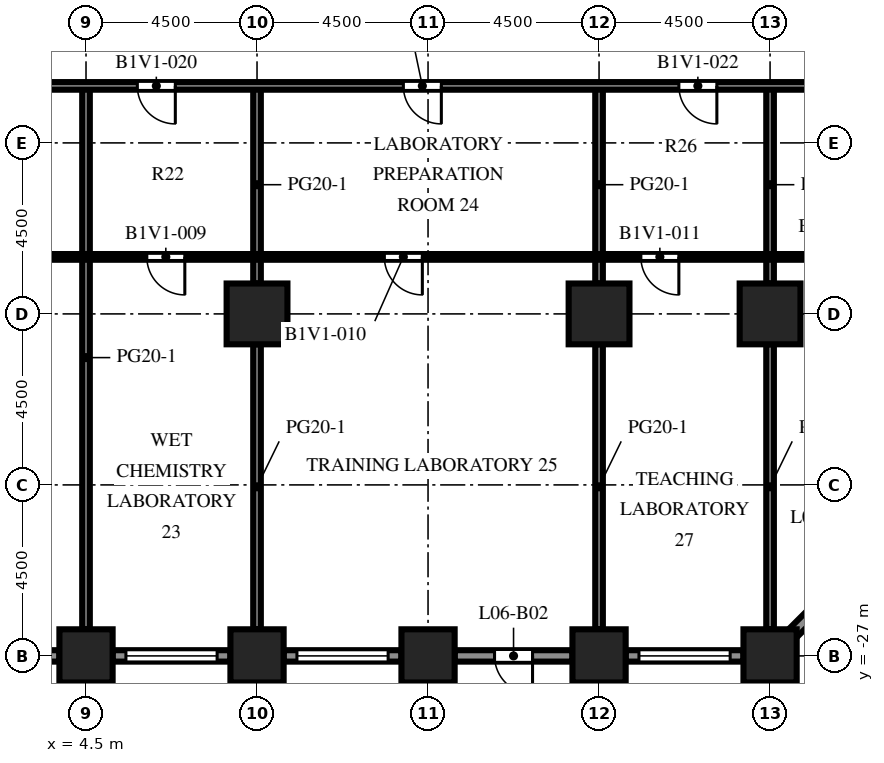
"""IFC4 building model, lengths in metres.
Left out: names, types, materials, properties, quantities, classifications, styles, units other than length and angle.
Written with IfcOpenShell. Run it as: python <this file> out.ifc"""

import sys

from ifc_helpers import new_model, si_unit, direction, frame, frame_2d, origin, origin_2d, place, context, subcontext, project, spatial, rectangle, extrude, element, fill, save


model = new_model("IFC4")
c1 = context("Model", 3, precision=1e-05, world=origin(), true_north=direction((0.0, 1.0)))
c2 = subcontext(c1, "Body", "Model", "MODEL_VIEW")
j1 = project(units=[si_unit("LENGTHUNIT", "METRE"), si_unit("PLANEANGLEUNIT", "RADIAN")], contexts=[c1])
p1 = place(None, origin())
s1 = spatial("IfcSite", under=j1, at=p1, CompositionType="ELEMENT")
p2 = place(p1, origin())
s2 = spatial("IfcBuilding", under=s1, at=p2, CompositionType="ELEMENT")
p3 = place(p2, frame((0.0, 0.0, 27.7)))
s3 = spatial("IfcBuildingStorey", under=s2, at=p3, CompositionType="ELEMENT", Elevation=27.7)
for number, where, z_axis, x_axis in (
    (1, (4.5, -27.0, 0.0), (0.0, 0.0, 1.0), (1.0, 0.0, 0.0)),
    (2, (9.0, -27.0, 0.0), (0.0, 0.0, 1.0), (1.0, 0.0, 0.0)),
    (3, (13.5, -27.0, 0.0), (0.0, 0.0, 1.0), (1.0, 0.0, 0.0)),
    (4, (18.0, -27.0, 0.0), (0.0, 0.0, 1.0), (1.0, 0.0, 0.0)),
    (5, (22.5, -27.0, 0.0), (0.0, 0.0, 1.0), (1.0, 0.0, 0.0)),
):
    element("IfcColumn", number, at=place(p3, frame(where, z_axis=z_axis, x_axis=x_axis)), inside=s3, PredefinedType="COLUMN", context=c2, shape_type="SweptSolid", body=[
        extrude(rectangle(XDim=1.4, YDim=1.4, at=origin_2d()), origin(), (0.0, 0.0, 1.0), 4.1),
    ])
for number, where, z_axis, x_axis in (
    (6, (9.0, -18.0, 0.0), (0.0, 0.0, 1.0), (1.0, 0.0, 0.0)),
    (7, (18.0, -18.0, 0.0), (0.0, 0.0, 1.0), (1.0, 0.0, 0.0)),
    (8, (22.5, -18.0, 0.0), (0.0, 0.0, 1.0), (1.0, 0.0, 0.0)),
):
    element("IfcColumn", number, at=place(p3, frame(where, z_axis=z_axis, x_axis=x_axis)), inside=s3, PredefinedType="COLUMN", context=c2, shape_type="SweptSolid", body=[
        extrude(rectangle(XDim=1.6, YDim=1.6, at=origin_2d()), origin(), (0.0, 0.0, 1.0), 4.1),
    ])
p4 = place(p3, frame((3.8, -27.0, 0.0), z_axis=(0.0, 0.0, 1.0), x_axis=(-1.0, 0.0, 0.0)))
e9 = element("IfcWall", 9, at=p4, inside=s3, PredefinedType="SOLIDWALL", context=c2, shape_type="SweptSolid", body=[
    extrude(rectangle(XDim=3.1, YDim=0.3, at=frame_2d((1.55, 0.0))), origin(), (0.0, 0.0, 1.0), 2.75),
])
p5 = place(p4, frame((0.35, 0.0, 0.8)))
e10 = element("IfcOpeningElement", 10, at=p5, cuts=e9, PredefinedType="OPENING", context=c2, shape_type="SweptSolid", body=[
    extrude(rectangle(XDim=2.4, YDim=1.7, at=frame_2d((1.2, 0.85))), frame((0.0, 0.16, 0.0), z_axis=(0.0, -1.0, 0.0), x_axis=(1.0, 0.0, 0.0)), (0.0, 0.0, 1.0), 0.32),
])
p6 = place(p3, frame((8.3, -27.0, 0.0), z_axis=(0.0, 0.0, 1.0), x_axis=(-1.0, 0.0, 0.0)))
e11 = element("IfcWall", 11, at=p6, inside=s3, PredefinedType="SOLIDWALL", context=c2, shape_type="SweptSolid", body=[
    extrude(rectangle(XDim=3.1, YDim=0.3, at=frame_2d((1.55, 0.0))), origin(), (0.0, 0.0, 1.0), 2.75),
])
p7 = place(p6, frame((0.35, 0.0, 0.8)))
e12 = element("IfcOpeningElement", 12, at=p7, cuts=e11, PredefinedType="OPENING", context=c2, shape_type="SweptSolid", body=[
    extrude(rectangle(XDim=2.4, YDim=1.7, at=frame_2d((1.2, 0.85))), frame((0.0, 0.16, 0.0), z_axis=(0.0, -1.0, 0.0), x_axis=(1.0, 0.0, 0.0)), (0.0, 0.0, 1.0), 0.32),
])
p8 = place(p3, frame((12.8, -27.0, 0.0), z_axis=(0.0, 0.0, 1.0), x_axis=(-1.0, 0.0, 0.0)))
e13 = element("IfcWall", 13, at=p8, inside=s3, PredefinedType="SOLIDWALL", context=c2, shape_type="SweptSolid", body=[
    extrude(rectangle(XDim=3.1, YDim=0.3, at=frame_2d((1.55, 0.0))), origin(), (0.0, 0.0, 1.0), 2.75),
])
p9 = place(p8, frame((0.35, 0.0, 0.8)))
e14 = element("IfcOpeningElement", 14, at=p9, cuts=e13, PredefinedType="OPENING", context=c2, shape_type="SweptSolid", body=[
    extrude(rectangle(XDim=2.4, YDim=1.7, at=frame_2d((1.2, 0.85))), frame((0.0, 0.16, 0.0), z_axis=(0.0, -1.0, 0.0), x_axis=(1.0, 0.0, 0.0)), (0.0, 0.0, 1.0), 0.32),
])
p10 = place(p3, frame((17.3, -27.0, 0.0), z_axis=(0.0, 0.0, 1.0), x_axis=(-1.0, 0.0, 0.0)))
e15 = element("IfcWall", 15, at=p10, inside=s3, PredefinedType="SOLIDWALL", context=c2, shape_type="SweptSolid", body=[
    extrude(rectangle(XDim=3.1, YDim=0.3, at=frame_2d((1.55, 0.0))), origin(), (0.0, 0.0, 1.0), 2.75),
])
p11 = place(p10, frame((1.05, 0.0, 0.0)))
e16 = element("IfcOpeningElement", 16, at=p11, cuts=e15, PredefinedType="OPENING", context=c2, shape_type="SweptSolid", body=[
    extrude(rectangle(XDim=1.0, YDim=2.2, at=frame_2d((0.5, 1.1))), frame((0.0, 0.16, 0.0), z_axis=(0.0, -1.0, 0.0), x_axis=(1.0, 0.0, 0.0)), (0.0, 0.0, 1.0), 0.32),
])
p12 = place(p3, frame((21.8, -27.0, 0.0), z_axis=(0.0, 0.0, 1.0), x_axis=(-1.0, 0.0, 0.0)))
e17 = element("IfcWall", 17, at=p12, inside=s3, PredefinedType="SOLIDWALL", context=c2, shape_type="SweptSolid", body=[
    extrude(rectangle(XDim=3.1, YDim=0.3, at=frame_2d((1.55, 0.0))), origin(), (0.0, 0.0, 1.0), 2.75),
])
p13 = place(p12, frame((0.35, 0.0, 0.8)))
e18 = element("IfcOpeningElement", 18, at=p13, cuts=e17, PredefinedType="OPENING", context=c2, shape_type="SweptSolid", body=[
    extrude(rectangle(XDim=2.4, YDim=1.7, at=frame_2d((1.2, 0.85))), frame((0.0, 0.16, 0.0), z_axis=(0.0, -1.0, 0.0), x_axis=(1.0, 0.0, 0.0)), (0.0, 0.0, 1.0), 0.32),
])
p14 = place(p3, frame((26.406, -23.094, 0.0), z_axis=(0.0, 0.0, 1.0), x_axis=(-0.707106781187, -0.707106781187, 0.0)))
e19 = element("IfcWall", 19, at=p14, inside=s3, PredefinedType="SOLIDWALL", context=c2, shape_type="SweptSolid", body=[
    extrude(rectangle(XDim=4.684, YDim=0.3, at=frame_2d((2.342, 0.0))), origin(), (0.0, 0.0, 1.0), 2.75),
])
p15 = place(p14, frame((1.742, 0.0, 0.0)))
e20 = element("IfcOpeningElement", 20, at=p15, cuts=e19, PredefinedType="OPENING", context=c2, shape_type="SweptSolid", body=[
    extrude(rectangle(XDim=1.2, YDim=2.2, at=frame_2d((0.6, 1.1))), frame((0.0, 0.16, 0.0), z_axis=(0.0, -1.0, 0.0), x_axis=(1.0, 0.0, 0.0)), (0.0, 0.0, 1.0), 0.32),
])
p16 = place(p3, frame((4.5, -26.3, 0.0), z_axis=(0.0, 0.0, 1.0), x_axis=(0.0, 1.0, 0.0)))
e21 = element("IfcWall", 21, at=p16, inside=s3, PredefinedType="PARTITIONING", context=c2, shape_type="SweptSolid", body=[
    extrude(rectangle(XDim=14.3, YDim=0.2, at=frame_2d((7.15, 0.0))), origin(), (0.0, 0.0, 1.0), 3.65),
])
p17 = place(p3, frame((9.0, -26.3, 0.0), z_axis=(0.0, 0.0, 1.0), x_axis=(0.0, 1.0, 0.0)))
e22 = element("IfcWall", 22, at=p17, inside=s3, PredefinedType="PARTITIONING", context=c2, shape_type="SweptSolid", body=[
    extrude(rectangle(XDim=7.5, YDim=0.2, at=frame_2d((3.75, 0.0))), origin(), (0.0, 0.0, 1.0), 3.65),
])
p18 = place(p3, frame((9.0, -17.2, 0.0), z_axis=(0.0, 0.0, 1.0), x_axis=(0.0, 1.0, 0.0)))
e23 = element("IfcWall", 23, at=p18, inside=s3, PredefinedType="PARTITIONING", context=c2, shape_type="SweptSolid", body=[
    extrude(rectangle(XDim=5.2, YDim=0.2, at=frame_2d((2.6, 0.0))), origin(), (0.0, 0.0, 1.0), 3.65),
])
p19 = place(p3, frame((18.0, -26.3, 0.0), z_axis=(0.0, 0.0, 1.0), x_axis=(0.0, 1.0, 0.0)))
e24 = element("IfcWall", 24, at=p19, inside=s3, PredefinedType="PARTITIONING", context=c2, shape_type="SweptSolid", body=[
    extrude(rectangle(XDim=7.5, YDim=0.2, at=frame_2d((3.75, 0.0))), origin(), (0.0, 0.0, 1.0), 3.65),
])
p20 = place(p3, frame((18.0, -17.2, 0.0), z_axis=(0.0, 0.0, 1.0), x_axis=(0.0, 1.0, 0.0)))
e25 = element("IfcWall", 25, at=p20, inside=s3, PredefinedType="PARTITIONING", context=c2, shape_type="SweptSolid", body=[
    extrude(rectangle(XDim=5.2, YDim=0.2, at=frame_2d((2.6, 0.0))), origin(), (0.0, 0.0, 1.0), 3.65),
])
p21 = place(p3, frame((22.5, -26.3, 0.0), z_axis=(0.0, 0.0, 1.0), x_axis=(0.0, 1.0, 0.0)))
e26 = element("IfcWall", 26, at=p21, inside=s3, PredefinedType="PARTITIONING", context=c2, shape_type="SweptSolid", body=[
    extrude(rectangle(XDim=7.5, YDim=0.2, at=frame_2d((3.75, 0.0))), origin(), (0.0, 0.0, 1.0), 3.65),
])
p22 = place(p3, frame((22.5, -17.2, 0.0), z_axis=(0.0, 0.0, 1.0), x_axis=(0.0, 1.0, 0.0)))
e27 = element("IfcWall", 27, at=p22, inside=s3, PredefinedType="PARTITIONING", context=c2, shape_type="SweptSolid", body=[
    extrude(rectangle(XDim=5.2, YDim=0.2, at=frame_2d((2.6, 0.0))), origin(), (0.0, 0.0, 1.0), 3.65),
])
p23 = place(p3, frame((26.85, -16.5, 0.0), z_axis=(0.0, 0.0, 1.0), x_axis=(-1.0, 0.0, 0.0)))
e28 = element("IfcWall", 28, at=p23, inside=s3, PredefinedType="PARTITIONING", context=c2, shape_type="SweptSolid", body=[
    extrude(rectangle(XDim=53.7, YDim=0.15, at=frame_2d((26.85, 0.0))), origin(), (0.0, 0.0, 1.0), 3.65),
])
p24 = place(p23, frame((50.75, 0.0, 0.0)))
e29 = element("IfcOpeningElement", 29, at=p24, cuts=e28, PredefinedType="OPENING", context=c2, shape_type="SweptSolid", body=[
    extrude(rectangle(XDim=1.0, YDim=2.1, at=frame_2d((0.5, 1.05))), frame((0.0, 0.085, 0.0), z_axis=(0.0, -1.0, 0.0), x_axis=(1.0, 0.0, 0.0)), (0.0, 0.0, 1.0), 0.17),
])
p25 = place(p23, frame((45.75, 0.0, 0.0)))
e30 = element("IfcOpeningElement", 30, at=p25, cuts=e28, PredefinedType="OPENING", context=c2, shape_type="SweptSolid", body=[
    extrude(rectangle(XDim=1.0, YDim=2.1, at=frame_2d((0.5, 1.05))), frame((0.0, 0.085, 0.0), z_axis=(0.0, -1.0, 0.0), x_axis=(1.0, 0.0, 0.0)), (0.0, 0.0, 1.0), 0.17),
])
p26 = place(p23, frame((37.75, 0.0, 0.0)))
e31 = element("IfcOpeningElement", 31, at=p26, cuts=e28, PredefinedType="OPENING", context=c2, shape_type="SweptSolid", body=[
    extrude(rectangle(XDim=1.0, YDim=2.1, at=frame_2d((0.5, 1.05))), frame((0.0, 0.085, 0.0), z_axis=(0.0, -1.0, 0.0), x_axis=(1.0, 0.0, 0.0)), (0.0, 0.0, 1.0), 0.17),
])
p27 = place(p23, frame((28.25, 0.0, 0.0)))
e32 = element("IfcOpeningElement", 32, at=p27, cuts=e28, PredefinedType="OPENING", context=c2, shape_type="SweptSolid", body=[
    extrude(rectangle(XDim=1.0, YDim=2.1, at=frame_2d((0.5, 1.05))), frame((0.0, 0.085, 0.0), z_axis=(0.0, -1.0, 0.0), x_axis=(1.0, 0.0, 0.0)), (0.0, 0.0, 1.0), 0.17),
])
p28 = place(p23, frame((19.75, 0.0, 0.0)))
e33 = element("IfcOpeningElement", 33, at=p28, cuts=e28, PredefinedType="OPENING", context=c2, shape_type="SweptSolid", body=[
    extrude(rectangle(XDim=1.0, YDim=2.1, at=frame_2d((0.5, 1.05))), frame((0.0, 0.085, 0.0), z_axis=(0.0, -1.0, 0.0), x_axis=(1.0, 0.0, 0.0)), (0.0, 0.0, 1.0), 0.17),
])
p29 = place(p23, frame((13.5, 0.0, 0.0)))
e34 = element("IfcOpeningElement", 34, at=p29, cuts=e28, PredefinedType="OPENING", context=c2, shape_type="SweptSolid", body=[
    extrude(rectangle(XDim=1.0, YDim=2.1, at=frame_2d((0.5, 1.05))), frame((0.0, 0.085, 0.0), z_axis=(0.0, -1.0, 0.0), x_axis=(1.0, 0.0, 0.0)), (0.0, 0.0, 1.0), 0.17),
])
p30 = place(p23, frame((6.75, 0.0, 0.0)))
e35 = element("IfcOpeningElement", 35, at=p30, cuts=e28, PredefinedType="OPENING", context=c2, shape_type="SweptSolid", body=[
    extrude(rectangle(XDim=1.0, YDim=2.1, at=frame_2d((0.5, 1.05))), frame((0.0, 0.085, 0.0), z_axis=(0.0, -1.0, 0.0), x_axis=(1.0, 0.0, 0.0)), (0.0, 0.0, 1.0), 0.17),
])
p31 = place(p23, frame((1.25, 0.0, 0.0)))
e36 = element("IfcOpeningElement", 36, at=p31, cuts=e28, PredefinedType="OPENING", context=c2, shape_type="SweptSolid", body=[
    extrude(rectangle(XDim=1.0, YDim=2.1, at=frame_2d((0.5, 1.05))), frame((0.0, 0.085, 0.0), z_axis=(0.0, -1.0, 0.0), x_axis=(1.0, 0.0, 0.0)), (0.0, 0.0, 1.0), 0.17),
])
p32 = place(p3, frame((26.85, -12.0, 0.0), z_axis=(0.0, 0.0, 1.0), x_axis=(-1.0, 0.0, 0.0)))
e37 = element("IfcWall", 37, at=p32, inside=s3, PredefinedType="PARTITIONING", context=c2, shape_type="SweptSolid", body=[
    extrude(rectangle(XDim=53.7, YDim=0.2, at=frame_2d((26.85, 0.0))), origin(), (0.0, 0.0, 1.0), 3.65),
])
p33 = place(p32, frame((51.5, 0.0, 0.0)))
e38 = element("IfcOpeningElement", 38, at=p33, cuts=e37, PredefinedType="OPENING", context=c2, shape_type="SweptSolid", body=[
    extrude(rectangle(XDim=1.0, YDim=2.1, at=frame_2d((0.5, 1.05))), frame((0.0, 0.11, 0.0), z_axis=(0.0, -1.0, 0.0), x_axis=(1.0, 0.0, 0.0)), (0.0, 0.0, 1.0), 0.22),
])
p34 = place(p32, frame((44.0, 0.0, 0.0)))
e39 = element("IfcOpeningElement", 39, at=p34, cuts=e37, PredefinedType="OPENING", context=c2, shape_type="SweptSolid", body=[
    extrude(rectangle(XDim=1.0, YDim=2.1, at=frame_2d((0.5, 1.05))), frame((0.0, 0.11, 0.0), z_axis=(0.0, -1.0, 0.0), x_axis=(1.0, 0.0, 0.0)), (0.0, 0.0, 1.0), 0.22),
])
p35 = place(p32, frame((37.25, 0.0, 0.0)))
e40 = element("IfcOpeningElement", 40, at=p35, cuts=e37, PredefinedType="OPENING", context=c2, shape_type="SweptSolid", body=[
    extrude(rectangle(XDim=1.0, YDim=2.1, at=frame_2d((0.5, 1.05))), frame((0.0, 0.11, 0.0), z_axis=(0.0, -1.0, 0.0), x_axis=(1.0, 0.0, 0.0)), (0.0, 0.0, 1.0), 0.22),
])
p36 = place(p32, frame((30.5, 0.0, 0.0)))
e41 = element("IfcOpeningElement", 41, at=p36, cuts=e37, PredefinedType="OPENING", context=c2, shape_type="SweptSolid", body=[
    extrude(rectangle(XDim=1.0, YDim=2.1, at=frame_2d((0.5, 1.05))), frame((0.0, 0.11, 0.0), z_axis=(0.0, -1.0, 0.0), x_axis=(1.0, 0.0, 0.0)), (0.0, 0.0, 1.0), 0.22),
])
p37 = place(p32, frame((20.0, 0.0, 0.0)))
e42 = element("IfcOpeningElement", 42, at=p37, cuts=e37, PredefinedType="OPENING", context=c2, shape_type="SweptSolid", body=[
    extrude(rectangle(XDim=1.0, YDim=2.1, at=frame_2d((0.5, 1.05))), frame((0.0, 0.11, 0.0), z_axis=(0.0, -1.0, 0.0), x_axis=(1.0, 0.0, 0.0)), (0.0, 0.0, 1.0), 0.22),
])
p38 = place(p32, frame((13.0, 0.0, 0.0)))
e43 = element("IfcOpeningElement", 43, at=p38, cuts=e37, PredefinedType="OPENING", context=c2, shape_type="SweptSolid", body=[
    extrude(rectangle(XDim=1.0, YDim=2.1, at=frame_2d((0.5, 1.05))), frame((0.0, 0.11, 0.0), z_axis=(0.0, -1.0, 0.0), x_axis=(1.0, 0.0, 0.0)), (0.0, 0.0, 1.0), 0.22),
])
p39 = place(p32, frame((5.75, 0.0, 0.0)))
e44 = element("IfcOpeningElement", 44, at=p39, cuts=e37, PredefinedType="OPENING", context=c2, shape_type="SweptSolid", body=[
    extrude(rectangle(XDim=1.0, YDim=2.1, at=frame_2d((0.5, 1.05))), frame((0.0, 0.11, 0.0), z_axis=(0.0, -1.0, 0.0), x_axis=(1.0, 0.0, 0.0)), (0.0, 0.0, 1.0), 0.22),
])
p40 = place(p32, frame((1.25, 0.0, 0.0)))
e45 = element("IfcOpeningElement", 45, at=p40, cuts=e37, PredefinedType="OPENING", context=c2, shape_type="SweptSolid", body=[
    extrude(rectangle(XDim=1.0, YDim=2.1, at=frame_2d((0.5, 1.05))), frame((0.0, 0.11, 0.0), z_axis=(0.0, -1.0, 0.0), x_axis=(1.0, 0.0, 0.0)), (0.0, 0.0, 1.0), 0.22),
])
p41 = place(p7, origin())
e46 = element("IfcWindow", 46, at=p41, inside=s3, PartitioningType="SINGLE_PANEL", PredefinedType="WINDOW", context=c2, shape_type="SweptSolid", body=[
    extrude(rectangle(XDim=2.4, YDim=1.7, at=frame_2d((1.2, 0.85))), frame((0.0, 0.03, 0.0), z_axis=(0.0, -1.0, 0.0), x_axis=(1.0, 0.0, 0.0)), (0.0, 0.0, 1.0), 0.06),
])
fill(e12, e46)
p42 = place(p9, origin())
e47 = element("IfcWindow", 47, at=p42, inside=s3, PartitioningType="SINGLE_PANEL", PredefinedType="WINDOW", context=c2, shape_type="SweptSolid", body=[
    extrude(rectangle(XDim=2.4, YDim=1.7, at=frame_2d((1.2, 0.85))), frame((0.0, 0.03, 0.0), z_axis=(0.0, -1.0, 0.0), x_axis=(1.0, 0.0, 0.0)), (0.0, 0.0, 1.0), 0.06),
])
fill(e14, e47)
p43 = place(p11, origin())
e48 = element("IfcDoor", 48, at=p43, inside=s3, OperationType="SINGLE_SWING_LEFT", PredefinedType="DOOR", context=c2, shape_type="SweptSolid", body=[
    extrude(rectangle(XDim=1.0, YDim=2.2, at=frame_2d((0.5, 1.1))), frame((0.0, 0.025, 0.0), z_axis=(0.0, -1.0, 0.0), x_axis=(1.0, 0.0, 0.0)), (0.0, 0.0, 1.0), 0.05),
])
fill(e16, e48)
p44 = place(p13, origin())
e49 = element("IfcWindow", 49, at=p44, inside=s3, PartitioningType="SINGLE_PANEL", PredefinedType="WINDOW", context=c2, shape_type="SweptSolid", body=[
    extrude(rectangle(XDim=2.4, YDim=1.7, at=frame_2d((1.2, 0.85))), frame((0.0, 0.03, 0.0), z_axis=(0.0, -1.0, 0.0), x_axis=(1.0, 0.0, 0.0)), (0.0, 0.0, 1.0), 0.06),
])
fill(e18, e49)
p45 = place(p28, origin())
e50 = element("IfcDoor", 50, at=p45, inside=s3, OperationType="SINGLE_SWING_LEFT", PredefinedType="DOOR", context=c2, shape_type="SweptSolid", body=[
    extrude(rectangle(XDim=1.0, YDim=2.1, at=frame_2d((0.5, 1.05))), frame((0.0, 0.025, 0.0), z_axis=(0.0, -1.0, 0.0), x_axis=(1.0, 0.0, 0.0)), (0.0, 0.0, 1.0), 0.05),
])
fill(e33, e50)
p46 = place(p29, origin())
e51 = element("IfcDoor", 51, at=p46, inside=s3, OperationType="SINGLE_SWING_LEFT", PredefinedType="DOOR", context=c2, shape_type="SweptSolid", body=[
    extrude(rectangle(XDim=1.0, YDim=2.1, at=frame_2d((0.5, 1.05))), frame((0.0, 0.025, 0.0), z_axis=(0.0, -1.0, 0.0), x_axis=(1.0, 0.0, 0.0)), (0.0, 0.0, 1.0), 0.05),
])
fill(e34, e51)
p47 = place(p30, origin())
e52 = element("IfcDoor", 52, at=p47, inside=s3, OperationType="SINGLE_SWING_LEFT", PredefinedType="DOOR", context=c2, shape_type="SweptSolid", body=[
    extrude(rectangle(XDim=1.0, YDim=2.1, at=frame_2d((0.5, 1.05))), frame((0.0, 0.025, 0.0), z_axis=(0.0, -1.0, 0.0), x_axis=(1.0, 0.0, 0.0)), (0.0, 0.0, 1.0), 0.05),
])
fill(e35, e52)
p48 = place(p37, origin())
e53 = element("IfcDoor", 53, at=p48, inside=s3, OperationType="SINGLE_SWING_LEFT", PredefinedType="DOOR", context=c2, shape_type="SweptSolid", body=[
    extrude(rectangle(XDim=1.0, YDim=2.1, at=frame_2d((0.5, 1.05))), frame((0.0, 0.025, 0.0), z_axis=(0.0, -1.0, 0.0), x_axis=(1.0, 0.0, 0.0)), (0.0, 0.0, 1.0), 0.05),
])
fill(e42, e53)
p49 = place(p38, origin())
e54 = element("IfcDoor", 54, at=p49, inside=s3, OperationType="SINGLE_SWING_LEFT", PredefinedType="DOOR", context=c2, shape_type="SweptSolid", body=[
    extrude(rectangle(XDim=1.0, YDim=2.1, at=frame_2d((0.5, 1.05))), frame((0.0, 0.025, 0.0), z_axis=(0.0, -1.0, 0.0), x_axis=(1.0, 0.0, 0.0)), (0.0, 0.0, 1.0), 0.05),
])
fill(e43, e54)
p50 = place(p39, origin())
e55 = element("IfcDoor", 55, at=p50, inside=s3, OperationType="SINGLE_SWING_LEFT", PredefinedType="DOOR", context=c2, shape_type="SweptSolid", body=[
    extrude(rectangle(XDim=1.0, YDim=2.1, at=frame_2d((0.5, 1.05))), frame((0.0, 0.025, 0.0), z_axis=(0.0, -1.0, 0.0), x_axis=(1.0, 0.0, 0.0)), (0.0, 0.0, 1.0), 0.05),
])
fill(e44, e55)
save(model, sys.argv[1])
